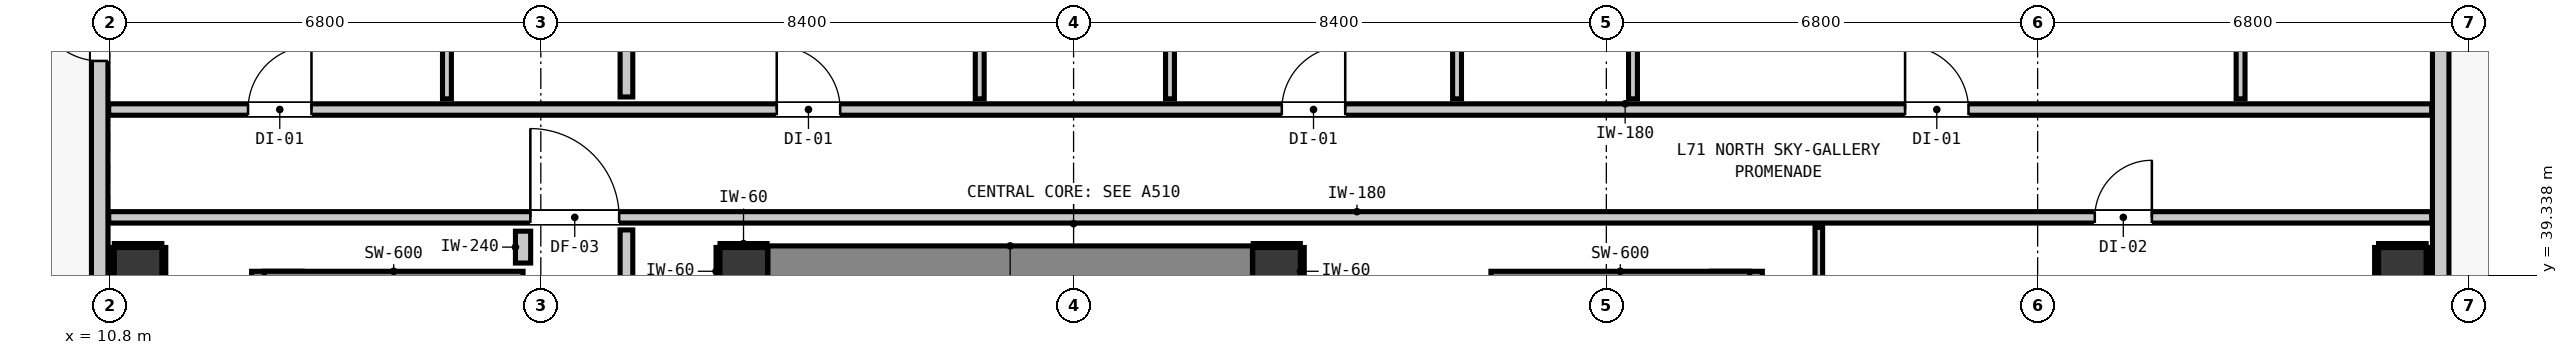
"""IFC4 building model, lengths in metres.
Left out: names, types, materials, properties, quantities, classifications, styles, units other than length and angle.
Written with IfcOpenShell. Run it as: python <this file> out.ifc"""

import sys

from ifc_helpers import new_model, si_unit, direction, frame, frame_2d, origin, origin_2d, place, context, subcontext, project, spatial, rectangle, extrude, element, fill, save


model = new_model("IFC4")
c1 = context("Model", 3, precision=1e-05, world=origin(), true_north=direction((0.0, 1.0)))
c2 = subcontext(c1, "Body", "Model", "MODEL_VIEW")
j1 = project(units=[si_unit("LENGTHUNIT", "METRE"), si_unit("PLANEANGLEUNIT", "RADIAN")], contexts=[c1])
p1 = place(None, origin())
s1 = spatial("IfcSite", under=j1, at=p1, CompositionType="ELEMENT")
p2 = place(p1, origin())
s2 = spatial("IfcBuilding", under=s1, at=p2, CompositionType="ELEMENT")
p3 = place(p2, frame((0.0, 0.0, 244.56)))
s3 = spatial("IfcBuildingStorey", under=s2, at=p3, CompositionType="ELEMENT", Elevation=244.56)
for number, where, z_axis, x_axis in (
    (1, (20.8, 39.4, 0.0), (0.0, 0.0, 1.0), (1.0, 0.0, 0.0)),
    (2, (29.2, 39.4, 0.0), (0.0, 0.0, 1.0), (1.0, 0.0, 0.0)),
):
    element("IfcColumn", number, at=place(p3, frame(where, z_axis=z_axis, x_axis=x_axis)), inside=s3, PredefinedType="COLUMN", context=c2, shape_type="SweptSolid", body=[
        extrude(rectangle(XDim=0.75, YDim=0.75, at=origin_2d()), origin(), (0.0, 0.0, 1.0), 3.32),
    ])
p4 = place(p3, frame((13.44, 31.08, 0.0), z_axis=(0.0, 0.0, 1.0), x_axis=(0.0, 1.0, 0.0)))
e3 = element("IfcWall", 3, at=p4, inside=s3, PredefinedType="SHEAR", context=c2, shape_type="SweptSolid", body=[
    extrude(rectangle(XDim=8.32, YDim=0.8, at=frame_2d((4.16, 0.0))), origin(), (0.0, 0.0, 1.0), 3.32),
])
p5 = place(p3, frame((13.24, 39.1, 0.0), z_axis=(0.0, 0.0, 1.0), x_axis=(1.0, 0.0, 0.0)))
e4 = element("IfcWall", 4, at=p5, inside=s3, PredefinedType="SHEAR", context=c2, shape_type="SweptSolid", body=[
    extrude(rectangle(XDim=4.08, YDim=0.6, at=frame_2d((2.04, 0.0))), origin(), (0.0, 0.0, 1.0), 3.32),
])
p6 = place(p3, frame((36.46, 31.08, 0.0), z_axis=(0.0, 0.0, 1.0), x_axis=(0.0, 1.0, 0.0)))
e5 = element("IfcWall", 5, at=p6, inside=s3, PredefinedType="SHEAR", context=c2, shape_type="SweptSolid", body=[
    extrude(rectangle(XDim=8.32, YDim=0.8, at=frame_2d((4.16, 0.0))), origin(), (0.0, 0.0, 1.0), 3.32),
])
p7 = place(p3, frame((32.58, 39.1, 0.0), z_axis=(0.0, 0.0, 1.0), x_axis=(1.0, 0.0, 0.0)))
e6 = element("IfcWall", 6, at=p7, inside=s3, PredefinedType="SHEAR", context=c2, shape_type="SweptSolid", body=[
    extrude(rectangle(XDim=4.08, YDim=0.6, at=frame_2d((2.04, 0.0))), origin(), (0.0, 0.0, 1.0), 3.32),
])
p8 = place(p3, frame((21.18, 39.4, 0.0), z_axis=(0.0, 0.0, 1.0), x_axis=(1.0, 0.0, 0.0)))
e7 = element("IfcWall", 7, at=p8, inside=s3, PredefinedType="SHEAR", context=c2, shape_type="SweptSolid", body=[
    extrude(rectangle(XDim=7.64, YDim=0.8, at=frame_2d((3.82, 0.0))), origin(), (0.0, 0.0, 1.0), 3.32),
])
for number, where, z_axis, x_axis in (
    (8, (11.25, 39.4, 0.0), (0.0, 0.0, 1.0), (1.0, 0.0, 0.0)),
    (9, (46.95, 39.4, 0.0), (0.0, 0.0, 1.0), (1.0, 0.0, 0.0)),
):
    element("IfcColumn", number, at=place(p3, frame(where, z_axis=z_axis, x_axis=x_axis)), inside=s3, PredefinedType="COLUMN", context=c2, shape_type="SweptSolid", body=[
        extrude(rectangle(XDim=0.75, YDim=0.75, at=origin_2d()), origin(), (0.0, 0.0, 1.0), 3.32),
    ])
p9 = place(p3, frame((10.645, 18.545, 0.0), z_axis=(0.0, 0.0, 1.0), x_axis=(0.0, 1.0, 0.0)))
e10 = element("IfcWall", 10, at=p9, inside=s3, PredefinedType="STANDARD", context=c2, shape_type="SweptSolid", body=[
    extrude(rectangle(XDim=30.31, YDim=0.26, at=frame_2d((15.155, 0.0))), origin(), (0.0, 0.0, 1.0), 3.1),
])
p10 = place(p9, frame((24.171, 0.0, 0.0)))
e11 = element("IfcOpeningElement", 11, at=p10, cuts=e10, PredefinedType="OPENING", context=c2, shape_type="SweptSolid", body=[
    extrude(rectangle(XDim=1.0, YDim=2.15, at=frame_2d((0.5, 1.075))), frame((0.0, 0.14, 0.0), z_axis=(0.0, -1.0, 0.0), x_axis=(1.0, 0.0, 0.0)), (0.0, 0.0, 1.0), 0.28),
])
p11 = place(p9, frame((27.195, 0.0, 0.85)))
e12 = element("IfcOpeningElement", 12, at=p11, cuts=e10, PredefinedType="OPENING", context=c2, shape_type="SweptSolid", body=[
    extrude(rectangle(XDim=1.2, YDim=1.8, at=frame_2d((0.6, 0.9))), frame((0.0, 0.14, 0.0), z_axis=(0.0, -1.0, 0.0), x_axis=(1.0, 0.0, 0.0)), (0.0, 0.0, 1.0), 0.28),
])
p12 = place(p3, frame((47.555, 48.855, 0.0), z_axis=(0.0, 0.0, 1.0), x_axis=(0.0, -1.0, 0.0)))
e13 = element("IfcWall", 13, at=p12, inside=s3, PredefinedType="STANDARD", context=c2, shape_type="SweptSolid", body=[
    extrude(rectangle(XDim=30.31, YDim=0.26, at=frame_2d((15.155, 0.0))), origin(), (0.0, 0.0, 1.0), 3.1),
])
p13 = place(p12, frame((3.729, 0.0, 0.0)))
e14 = element("IfcOpeningElement", 14, at=p13, cuts=e13, PredefinedType="OPENING", context=c2, shape_type="SweptSolid", body=[
    extrude(rectangle(XDim=1.0, YDim=2.15, at=frame_2d((0.5, 1.075))), frame((0.0, 0.14, 0.0), z_axis=(0.0, -1.0, 0.0), x_axis=(1.0, 0.0, 0.0)), (0.0, 0.0, 1.0), 0.28),
])
p14 = place(p3, frame((10.787, 40.25, 0.0), z_axis=(0.0, 0.0, 1.0), x_axis=(1.0, 0.0, 0.0)))
e15 = element("IfcWall", 15, at=p14, inside=s3, PredefinedType="PARTITIONING", context=c2, shape_type="SweptSolid", body=[
    extrude(rectangle(XDim=36.626, YDim=0.18, at=frame_2d((18.313, 0.0))), origin(), (0.0, 0.0, 1.0), 3.1),
])
p15 = place(p14, frame((6.648, 0.0, 0.0)))
e16 = element("IfcOpeningElement", 16, at=p15, cuts=e15, PredefinedType="OPENING", context=c2, shape_type="SweptSolid", body=[
    extrude(rectangle(XDim=1.4, YDim=2.15, at=frame_2d((0.7, 1.075))), frame((0.0, 0.1, 0.0), z_axis=(0.0, -1.0, 0.0), x_axis=(1.0, 0.0, 0.0)), (0.0, 0.0, 1.0), 0.2),
])
p16 = place(p14, frame((31.314, 0.0, 0.0)))
e17 = element("IfcOpeningElement", 17, at=p16, cuts=e15, PredefinedType="OPENING", context=c2, shape_type="SweptSolid", body=[
    extrude(rectangle(XDim=0.9, YDim=2.1, at=frame_2d((0.45, 1.05))), frame((0.0, 0.1, 0.0), z_axis=(0.0, -1.0, 0.0), x_axis=(1.0, 0.0, 0.0)), (0.0, 0.0, 1.0), 0.2),
])
p17 = place(p3, frame((10.787, 41.95, 0.0), z_axis=(0.0, 0.0, 1.0), x_axis=(1.0, 0.0, 0.0)))
e18 = element("IfcWall", 18, at=p17, inside=s3, PredefinedType="PARTITIONING", context=c2, shape_type="SweptSolid", body=[
    extrude(rectangle(XDim=36.626, YDim=0.18, at=frame_2d((18.313, 0.0))), origin(), (0.0, 0.0, 1.0), 3.1),
])
p18 = place(p17, frame((2.197, 0.0, 0.0)))
e19 = element("IfcOpeningElement", 19, at=p18, cuts=e18, PredefinedType="OPENING", context=c2, shape_type="SweptSolid", body=[
    extrude(rectangle(XDim=1.0, YDim=2.15, at=frame_2d((0.5, 1.075))), frame((0.0, 0.1, 0.0), z_axis=(0.0, -1.0, 0.0), x_axis=(1.0, 0.0, 0.0)), (0.0, 0.0, 1.0), 0.2),
])
p19 = place(p17, frame((10.533, 0.0, 0.0)))
e20 = element("IfcOpeningElement", 20, at=p19, cuts=e18, PredefinedType="OPENING", context=c2, shape_type="SweptSolid", body=[
    extrude(rectangle(XDim=1.0, YDim=2.15, at=frame_2d((0.5, 1.075))), frame((0.0, 0.1, 0.0), z_axis=(0.0, -1.0, 0.0), x_axis=(1.0, 0.0, 0.0)), (0.0, 0.0, 1.0), 0.2),
])
p20 = place(p17, frame((18.496, 0.0, 0.0)))
e21 = element("IfcOpeningElement", 21, at=p20, cuts=e18, PredefinedType="OPENING", context=c2, shape_type="SweptSolid", body=[
    extrude(rectangle(XDim=1.0, YDim=2.15, at=frame_2d((0.5, 1.075))), frame((0.0, 0.1, 0.0), z_axis=(0.0, -1.0, 0.0), x_axis=(1.0, 0.0, 0.0)), (0.0, 0.0, 1.0), 0.2),
])
p21 = place(p17, frame((28.323, 0.0, 0.0)))
e22 = element("IfcOpeningElement", 22, at=p21, cuts=e18, PredefinedType="OPENING", context=c2, shape_type="SweptSolid", body=[
    extrude(rectangle(XDim=1.0, YDim=2.15, at=frame_2d((0.5, 1.075))), frame((0.0, 0.1, 0.0), z_axis=(0.0, -1.0, 0.0), x_axis=(1.0, 0.0, 0.0)), (0.0, 0.0, 1.0), 0.2),
])
p22 = place(p3, frame((17.32, 39.53, 0.0), z_axis=(0.0, 0.0, 1.0), x_axis=(0.0, 1.0, 0.0)))
e23 = element("IfcWall", 23, at=p22, inside=s3, PredefinedType="PARTITIONING", context=c2, shape_type="SweptSolid", body=[
    extrude(rectangle(XDim=0.502, YDim=0.24, at=frame_2d((0.251, 0.0))), origin(), (0.0, 0.0, 1.0), 3.1),
])
p23 = place(p3, frame((18.95, 38.918, 0.0), z_axis=(0.0, 0.0, 1.0), x_axis=(0.0, 1.0, 0.0)))
e24 = element("IfcWall", 24, at=p23, inside=s3, PredefinedType="PARTITIONING", context=c2, shape_type="SweptSolid", body=[
    extrude(rectangle(XDim=1.134, YDim=0.2, at=frame_2d((0.567, 0.0))), origin(), (0.0, 0.0, 1.0), 3.1),
])
p24 = place(p3, frame((18.95, 42.148, 0.0), z_axis=(0.0, 0.0, 1.0), x_axis=(0.0, 1.0, 0.0)))
e25 = element("IfcWall", 25, at=p24, inside=s3, PredefinedType="PARTITIONING", context=c2, shape_type="SweptSolid", body=[
    extrude(rectangle(XDim=3.43, YDim=0.2, at=frame_2d((1.715, 0.0))), origin(), (0.0, 0.0, 1.0), 3.1),
])
p25 = place(p3, frame((16.12, 42.118, 0.0), z_axis=(0.0, 0.0, 1.0), x_axis=(0.0, 1.0, 0.0)))
e26 = element("IfcWall", 26, at=p25, inside=s3, PredefinedType="PARTITIONING", context=c2, shape_type="SweptSolid", body=[
    extrude(rectangle(XDim=3.49, YDim=0.14, at=frame_2d((1.745, 0.0))), origin(), (0.0, 0.0, 1.0), 3.1),
])
p26 = place(p25, frame((1.298, 0.0, 0.0)))
e27 = element("IfcOpeningElement", 27, at=p26, cuts=e26, PredefinedType="OPENING", context=c2, shape_type="SweptSolid", body=[
    extrude(rectangle(XDim=0.9, YDim=2.1, at=frame_2d((0.45, 1.05))), frame((0.0, 0.08, 0.0), z_axis=(0.0, -1.0, 0.0), x_axis=(1.0, 0.0, 0.0)), (0.0, 0.0, 1.0), 0.16),
])
p27 = place(p3, frame((24.52, 42.118, 0.0), z_axis=(0.0, 0.0, 1.0), x_axis=(0.0, 1.0, 0.0)))
e28 = element("IfcWall", 28, at=p27, inside=s3, PredefinedType="PARTITIONING", context=c2, shape_type="SweptSolid", body=[
    extrude(rectangle(XDim=3.49, YDim=0.14, at=frame_2d((1.745, 0.0))), origin(), (0.0, 0.0, 1.0), 3.1),
])
p28 = place(p27, frame((1.298, 0.0, 0.0)))
e29 = element("IfcOpeningElement", 29, at=p28, cuts=e28, PredefinedType="OPENING", context=c2, shape_type="SweptSolid", body=[
    extrude(rectangle(XDim=0.9, YDim=2.1, at=frame_2d((0.45, 1.05))), frame((0.0, 0.08, 0.0), z_axis=(0.0, -1.0, 0.0), x_axis=(1.0, 0.0, 0.0)), (0.0, 0.0, 1.0), 0.16),
])
p29 = place(p3, frame((27.52, 42.118, 0.0), z_axis=(0.0, 0.0, 1.0), x_axis=(0.0, 1.0, 0.0)))
e30 = element("IfcWall", 30, at=p29, inside=s3, PredefinedType="PARTITIONING", context=c2, shape_type="SweptSolid", body=[
    extrude(rectangle(XDim=3.49, YDim=0.14, at=frame_2d((1.745, 0.0))), origin(), (0.0, 0.0, 1.0), 3.1),
])
p30 = place(p3, frame((32.046, 42.118, 0.0), z_axis=(0.0, 0.0, 1.0), x_axis=(0.0, 1.0, 0.0)))
e31 = element("IfcWall", 31, at=p30, inside=s3, PredefinedType="PARTITIONING", context=c2, shape_type="SweptSolid", body=[
    extrude(rectangle(XDim=3.49, YDim=0.14, at=frame_2d((1.745, 0.0))), origin(), (0.0, 0.0, 1.0), 3.1),
])
p31 = place(p30, frame((1.298, 0.0, 0.0)))
e32 = element("IfcOpeningElement", 32, at=p31, cuts=e31, PredefinedType="OPENING", context=c2, shape_type="SweptSolid", body=[
    extrude(rectangle(XDim=0.9, YDim=2.1, at=frame_2d((0.45, 1.05))), frame((0.0, 0.08, 0.0), z_axis=(0.0, -1.0, 0.0), x_axis=(1.0, 0.0, 0.0)), (0.0, 0.0, 1.0), 0.16),
])
p32 = place(p3, frame((34.82, 42.118, 0.0), z_axis=(0.0, 0.0, 1.0), x_axis=(0.0, 1.0, 0.0)))
e33 = element("IfcWall", 33, at=p32, inside=s3, PredefinedType="PARTITIONING", context=c2, shape_type="SweptSolid", body=[
    extrude(rectangle(XDim=3.49, YDim=0.14, at=frame_2d((1.745, 0.0))), origin(), (0.0, 0.0, 1.0), 3.1),
])
p33 = place(p3, frame((44.4, 42.118, 0.0), z_axis=(0.0, 0.0, 1.0), x_axis=(0.0, 1.0, 0.0)))
e34 = element("IfcWall", 34, at=p33, inside=s3, PredefinedType="PARTITIONING", context=c2, shape_type="SweptSolid", body=[
    extrude(rectangle(XDim=3.49, YDim=0.14, at=frame_2d((1.745, 0.0))), origin(), (0.0, 0.0, 1.0), 3.1),
])
p34 = place(p33, frame((1.285, 0.0, 0.0)))
e35 = element("IfcOpeningElement", 35, at=p34, cuts=e34, PredefinedType="OPENING", context=c2, shape_type="SweptSolid", body=[
    extrude(rectangle(XDim=0.9, YDim=2.1, at=frame_2d((0.45, 1.05))), frame((0.0, 0.08, 0.0), z_axis=(0.0, -1.0, 0.0), x_axis=(1.0, 0.0, 0.0)), (0.0, 0.0, 1.0), 0.16),
])
p35 = place(p3, frame((37.75, 32.138, 0.0), z_axis=(0.0, 0.0, 1.0), x_axis=(0.0, 1.0, 0.0)))
e36 = element("IfcWall", 36, at=p35, inside=s3, PredefinedType="PARTITIONING", context=c2, shape_type="SweptSolid", body=[
    extrude(rectangle(XDim=7.954, YDim=0.12, at=frame_2d((3.977, 0.0))), origin(), (0.0, 0.0, 1.0), 3.1),
])
p36 = place(p3, frame((20.425, 39.807, 0.0), z_axis=(0.0, 0.0, 1.0), x_axis=(1.0, 0.0, 0.0)))
e37 = element("IfcWall", 37, at=p36, inside=s3, PredefinedType="PARTITIONING", context=c2, shape_type="SweptSolid", body=[
    extrude(rectangle(XDim=0.742, YDim=0.06, at=frame_2d((0.371, 0.0))), origin(), (0.0, 0.0, 1.0), 1.45),
])
p37 = place(p3, frame((20.393, 39.025, 0.0), z_axis=(0.0, 0.0, 1.0), x_axis=(0.0, 1.0, 0.0)))
e38 = element("IfcWall", 38, at=p37, inside=s3, PredefinedType="PARTITIONING", context=c2, shape_type="SweptSolid", body=[
    extrude(rectangle(XDim=0.75, YDim=0.06, at=frame_2d((0.375, 0.0))), origin(), (0.0, 0.0, 1.0), 1.45),
])
p38 = place(p3, frame((28.833, 39.807, 0.0), z_axis=(0.0, 0.0, 1.0), x_axis=(1.0, 0.0, 0.0)))
e39 = element("IfcWall", 39, at=p38, inside=s3, PredefinedType="PARTITIONING", context=c2, shape_type="SweptSolid", body=[
    extrude(rectangle(XDim=0.742, YDim=0.06, at=frame_2d((0.371, 0.0))), origin(), (0.0, 0.0, 1.0), 1.45),
])
for number, where, z_axis, x_axis in (
    (40, (29.607, 39.025, 0.0), (0.0, 0.0, 1.0), (0.0, 1.0, 0.0)),
    (41, (10.875, 39.807, 0.0), (0.0, 0.0, 1.0), (1.0, 0.0, 0.0)),
    (42, (10.843, 39.025, 0.0), (0.0, 0.0, 1.0), (0.0, 1.0, 0.0)),
    (43, (11.657, 39.025, 0.0), (0.0, 0.0, 1.0), (0.0, 1.0, 0.0)),
    (44, (46.575, 39.807, 0.0), (0.0, 0.0, 1.0), (1.0, 0.0, 0.0)),
    (45, (46.543, 39.025, 0.0), (0.0, 0.0, 1.0), (0.0, 1.0, 0.0)),
    (46, (47.357, 39.025, 0.0), (0.0, 0.0, 1.0), (0.0, 1.0, 0.0)),
):
    element("IfcWall", number, at=place(p3, frame(where, z_axis=z_axis, x_axis=x_axis)), inside=s3, PredefinedType="PARTITIONING", context=c2, shape_type="SweptSolid", body=[
        extrude(rectangle(XDim=0.75, YDim=0.06, at=frame_2d((0.375, 0.0))), origin(), (0.0, 0.0, 1.0), 1.45),
    ])
p39 = place(p10, origin())
e47 = element("IfcDoor", 47, at=p39, inside=s3, OperationType="SINGLE_SWING_RIGHT", PredefinedType="DOOR", context=c2, shape_type="SweptSolid", body=[
    extrude(rectangle(XDim=1.0, YDim=2.15, at=frame_2d((0.5, 1.075))), frame((0.0, 0.025, 0.0), z_axis=(0.0, -1.0, 0.0), x_axis=(1.0, 0.0, 0.0)), (0.0, 0.0, 1.0), 0.05),
])
fill(e11, e47)
p40 = place(p15, origin())
e48 = element("IfcDoor", 48, at=p40, inside=s3, OperationType="SINGLE_SWING_LEFT", PredefinedType="DOOR", context=c2, shape_type="SweptSolid", body=[
    extrude(rectangle(XDim=1.4, YDim=2.15, at=frame_2d((0.7, 1.075))), frame((0.0, 0.025, 0.0), z_axis=(0.0, -1.0, 0.0), x_axis=(1.0, 0.0, 0.0)), (0.0, 0.0, 1.0), 0.05),
])
fill(e16, e48)
p41 = place(p18, origin())
e49 = element("IfcDoor", 49, at=p41, inside=s3, OperationType="SINGLE_SWING_RIGHT", PredefinedType="DOOR", context=c2, shape_type="SweptSolid", body=[
    extrude(rectangle(XDim=1.0, YDim=2.15, at=frame_2d((0.5, 1.075))), frame((0.0, 0.025, 0.0), z_axis=(0.0, -1.0, 0.0), x_axis=(1.0, 0.0, 0.0)), (0.0, 0.0, 1.0), 0.05),
])
fill(e19, e49)
p42 = place(p19, origin())
e50 = element("IfcDoor", 50, at=p42, inside=s3, OperationType="SINGLE_SWING_LEFT", PredefinedType="DOOR", context=c2, shape_type="SweptSolid", body=[
    extrude(rectangle(XDim=1.0, YDim=2.15, at=frame_2d((0.5, 1.075))), frame((0.0, 0.025, 0.0), z_axis=(0.0, -1.0, 0.0), x_axis=(1.0, 0.0, 0.0)), (0.0, 0.0, 1.0), 0.05),
])
fill(e20, e50)
p43 = place(p20, origin())
e51 = element("IfcDoor", 51, at=p43, inside=s3, OperationType="SINGLE_SWING_RIGHT", PredefinedType="DOOR", context=c2, shape_type="SweptSolid", body=[
    extrude(rectangle(XDim=1.0, YDim=2.15, at=frame_2d((0.5, 1.075))), frame((0.0, 0.025, 0.0), z_axis=(0.0, -1.0, 0.0), x_axis=(1.0, 0.0, 0.0)), (0.0, 0.0, 1.0), 0.05),
])
fill(e21, e51)
p44 = place(p21, origin())
e52 = element("IfcDoor", 52, at=p44, inside=s3, OperationType="SINGLE_SWING_LEFT", PredefinedType="DOOR", context=c2, shape_type="SweptSolid", body=[
    extrude(rectangle(XDim=1.0, YDim=2.15, at=frame_2d((0.5, 1.075))), frame((0.0, 0.025, 0.0), z_axis=(0.0, -1.0, 0.0), x_axis=(1.0, 0.0, 0.0)), (0.0, 0.0, 1.0), 0.05),
])
fill(e22, e52)
p45 = place(p16, origin())
e53 = element("IfcDoor", 53, at=p45, inside=s3, OperationType="SINGLE_SWING_RIGHT", PredefinedType="DOOR", context=c2, shape_type="SweptSolid", body=[
    extrude(rectangle(XDim=0.9, YDim=2.1, at=frame_2d((0.45, 1.05))), frame((0.0, 0.025, 0.0), z_axis=(0.0, -1.0, 0.0), x_axis=(1.0, 0.0, 0.0)), (0.0, 0.0, 1.0), 0.05),
])
fill(e17, e53)
save(model, sys.argv[1])
